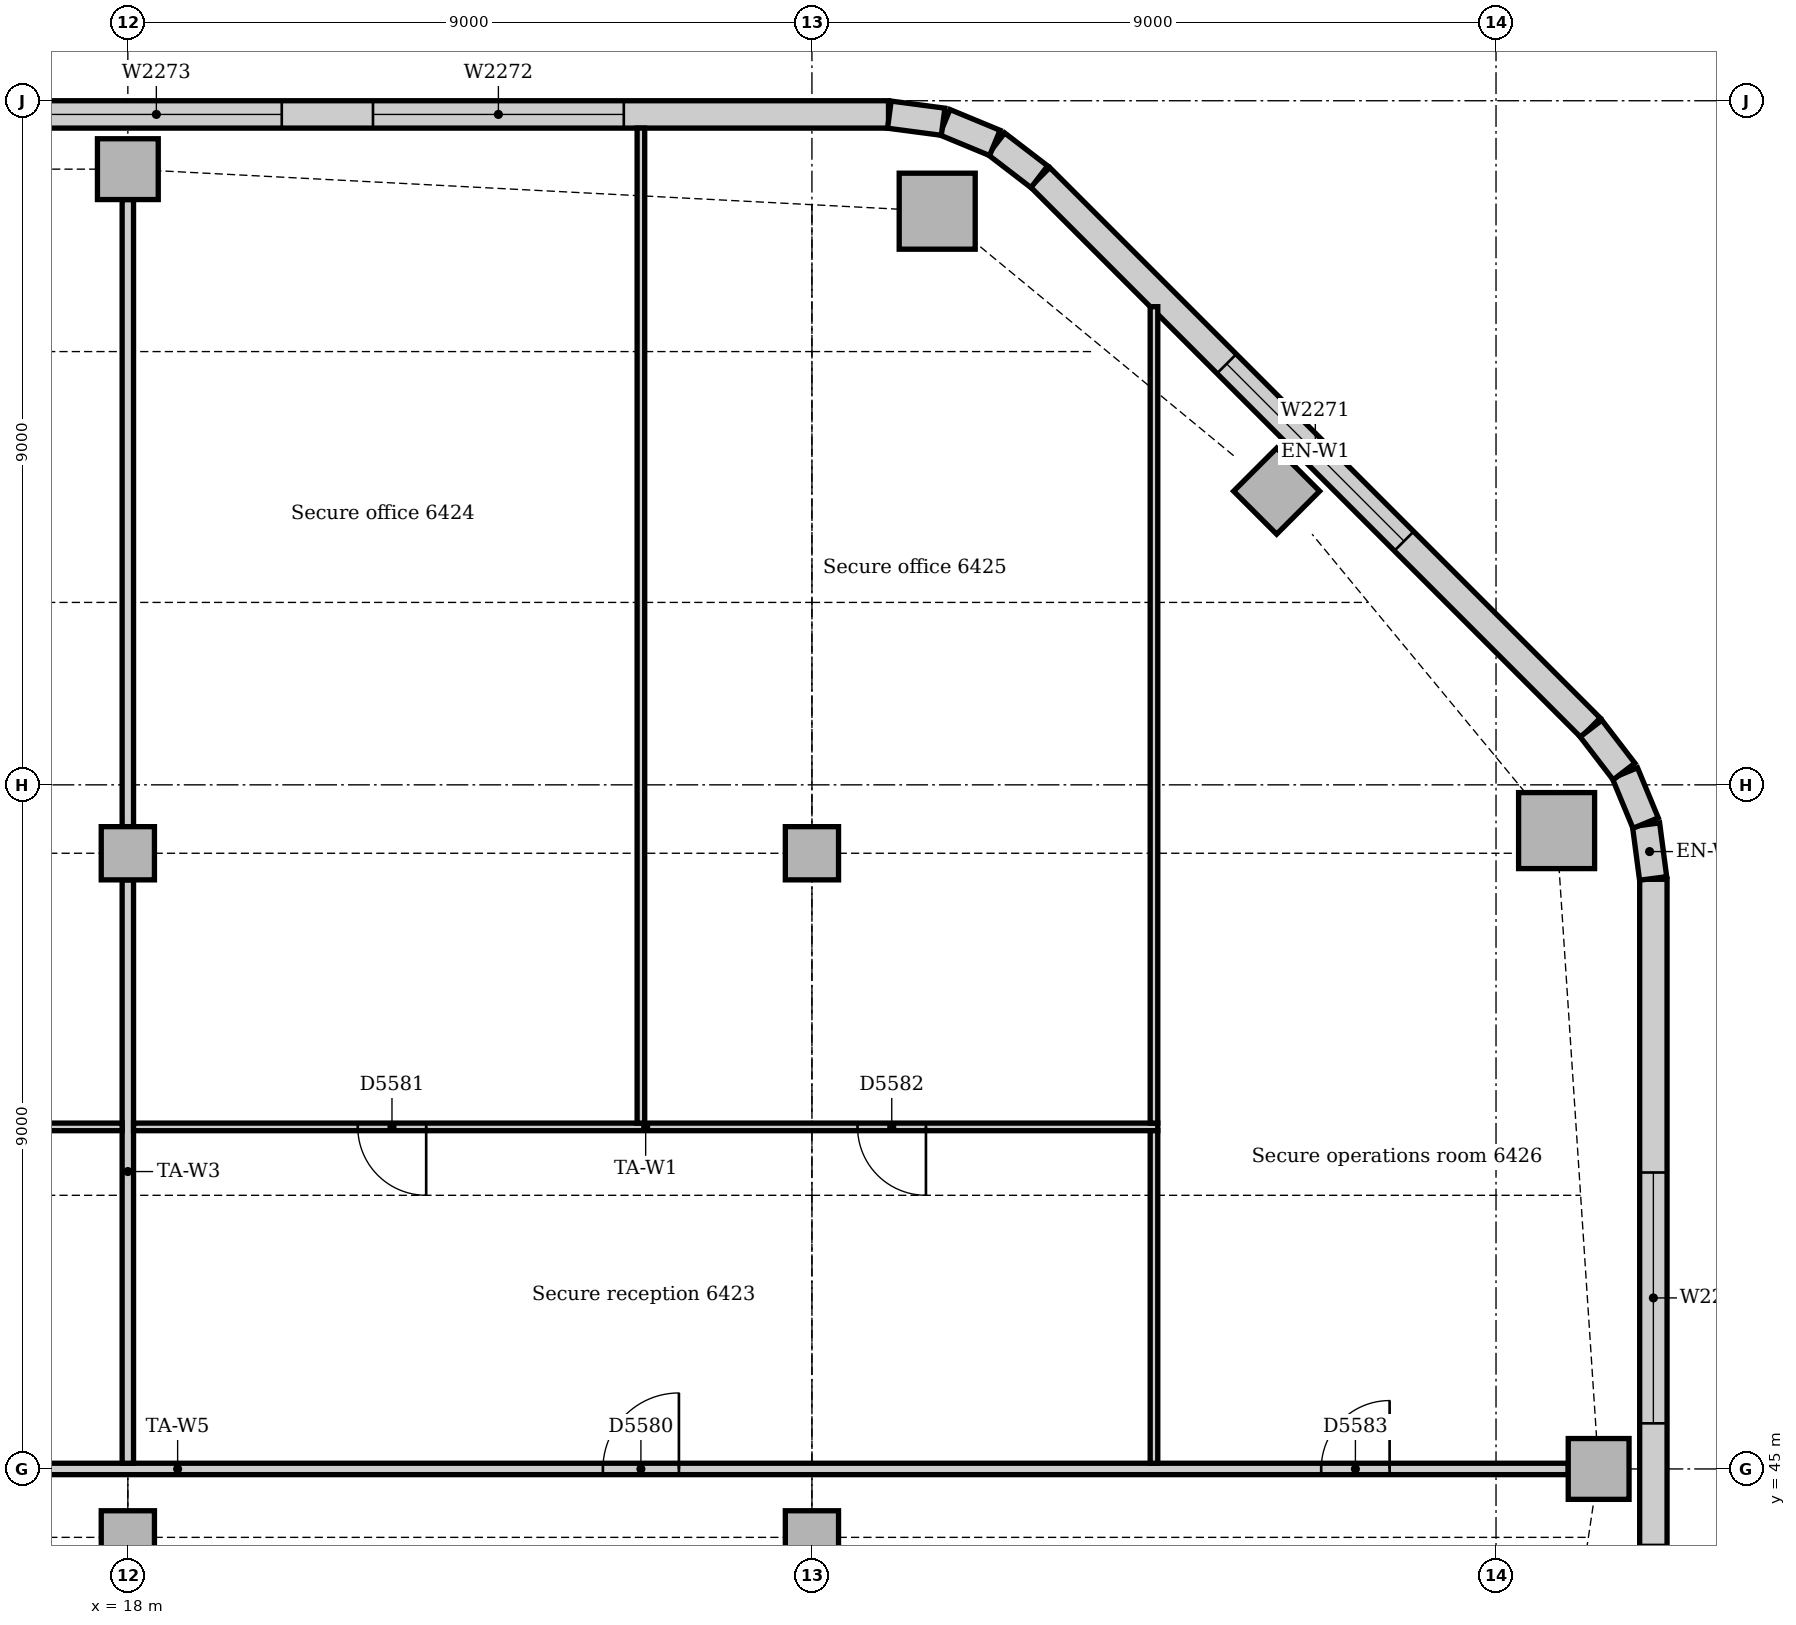
"""IFC4 building model, lengths in metres.
Left out: names, types, materials, properties, quantities, classifications, styles, units other than length and angle.
Written with IfcOpenShell. Run it as: python <this file> out.ifc"""

import sys

from ifc_helpers import new_model, si_unit, direction, frame, frame_2d, origin, origin_2d, place, context, subcontext, project, spatial, rectangle, extrude, element, fill, save


model = new_model("IFC4")
c1 = context("Model", 3, precision=1e-05, world=origin(), true_north=direction((0.0, 1.0)))
c2 = subcontext(c1, "Body", "Model", "MODEL_VIEW")
j1 = project(units=[si_unit("LENGTHUNIT", "METRE"), si_unit("PLANEANGLEUNIT", "RADIAN")], contexts=[c1])
p1 = place(None, origin())
s1 = spatial("IfcSite", under=j1, at=p1, CompositionType="ELEMENT")
p2 = place(p1, origin())
s2 = spatial("IfcBuilding", under=s1, at=p2, CompositionType="ELEMENT")
p3 = place(p2, frame((0.0, 0.0, 267.0)))
s3 = spatial("IfcBuildingStorey", under=s2, at=p3, CompositionType="ELEMENT", Elevation=267.0)
for number, where, z_axis, x_axis in (
    (1, (36.797, 53.398, 0.0), (0.0, 0.0, 1.0), (1.0, 0.0, 0.0)),
    (2, (28.648, 61.547, 0.0), (0.0, 0.0, 1.0), (1.0, 0.0, 0.0)),
):
    element("IfcColumn", number, at=place(p3, frame(where, z_axis=z_axis, x_axis=x_axis)), inside=s3, PredefinedType="COLUMN", context=c2, shape_type="SweptSolid", body=[
        extrude(rectangle(XDim=1.0, YDim=1.0, at=origin_2d()), origin(), (0.0, 0.0, 1.0), 3.85),
    ])
for number, where, z_axis, x_axis in (
    (3, (37.35, 45.0, 0.0), (0.0, 0.0, 1.0), (1.0, 0.0, 0.0)),
    (4, (33.114, 57.864, 0.0), (0.0, 0.0, 1.0), (0.707, 0.707, 0.0)),
    (5, (18.0, 62.1, 0.0), (0.0, 0.0, 1.0), (1.0, 0.0, 0.0)),
):
    element("IfcColumn", number, at=place(p3, frame(where, z_axis=z_axis, x_axis=x_axis)), inside=s3, PredefinedType="COLUMN", context=c2, shape_type="SweptSolid", body=[
        extrude(rectangle(XDim=0.8, YDim=0.8, at=origin_2d()), origin(), (0.0, 0.0, 1.0), 3.85),
    ])
for number, where, z_axis, x_axis in (
    (6, (18.0, 44.1, 0.0), (0.0, 0.0, 1.0), (1.0, 0.0, 0.0)),
    (7, (18.0, 53.1, 0.0), (0.0, 0.0, 1.0), (1.0, 0.0, 0.0)),
    (8, (27.0, 44.1, 0.0), (0.0, 0.0, 1.0), (1.0, 0.0, 0.0)),
    (9, (27.0, 53.1, 0.0), (0.0, 0.0, 1.0), (1.0, 0.0, 0.0)),
):
    element("IfcColumn", number, at=place(p3, frame(where, z_axis=z_axis, x_axis=x_axis)), inside=s3, PredefinedType="COLUMN", context=c2, shape_type="SweptSolid", body=[
        extrude(rectangle(XDim=0.7, YDim=0.7, at=origin_2d()), origin(), (0.0, 0.0, 1.0), 3.85),
    ])
p4 = place(p3, frame((38.07, 28.243, 0.0), z_axis=(0.0, 0.0, 1.0), x_axis=(0.0, 1.0, 0.0)))
e10 = element("IfcWall", 10, at=p4, inside=s3, PredefinedType="STANDARD", context=c2, shape_type="SweptSolid", body=[
    extrude(rectangle(XDim=24.515, YDim=0.36, at=frame_2d((12.257, 0.0))), origin(), (0.0, 0.0, 1.0), 3.85),
])
p5 = place(p4, frame((3.857, 0.0, 0.9)))
e11 = element("IfcOpeningElement", 11, at=p5, cuts=e10, PredefinedType="OPENING", context=c2, shape_type="SweptSolid", body=[
    extrude(rectangle(XDim=3.3, YDim=1.6, at=frame_2d((1.65, 0.8))), frame((0.0, 0.19, 0.0), z_axis=(0.0, -1.0, 0.0), x_axis=(1.0, 0.0, 0.0)), (0.0, 0.0, 1.0), 0.38),
])
p6 = place(p4, frame((8.357, 0.0, 0.9)))
e12 = element("IfcOpeningElement", 12, at=p6, cuts=e10, PredefinedType="OPENING", context=c2, shape_type="SweptSolid", body=[
    extrude(rectangle(XDim=3.3, YDim=1.6, at=frame_2d((1.65, 0.8))), frame((0.0, 0.19, 0.0), z_axis=(0.0, -1.0, 0.0), x_axis=(1.0, 0.0, 0.0)), (0.0, 0.0, 1.0), 0.38),
])
p7 = place(p4, frame((13.957, 0.0, 0.9)))
e13 = element("IfcOpeningElement", 13, at=p7, cuts=e10, PredefinedType="OPENING", context=c2, shape_type="SweptSolid", body=[
    extrude(rectangle(XDim=1.8, YDim=1.6, at=frame_2d((0.9, 0.8))), frame((0.0, 0.19, 0.0), z_axis=(0.0, -1.0, 0.0), x_axis=(1.0, 0.0, 0.0)), (0.0, 0.0, 1.0), 0.38),
])
p8 = place(p4, frame((17.357, 0.0, 0.9)))
e14 = element("IfcOpeningElement", 14, at=p8, cuts=e10, PredefinedType="OPENING", context=c2, shape_type="SweptSolid", body=[
    extrude(rectangle(XDim=3.3, YDim=1.6, at=frame_2d((1.65, 0.8))), frame((0.0, 0.19, 0.0), z_axis=(0.0, -1.0, 0.0), x_axis=(1.0, 0.0, 0.0)), (0.0, 0.0, 1.0), 0.38),
])
p9 = place(p3, frame((37.244, 54.751, 0.0), z_axis=(0.0, 0.0, 1.0), x_axis=(-0.707106781187, 0.707106781187, 0.0)))
e15 = element("IfcWall", 15, at=p9, inside=s3, PredefinedType="STANDARD", context=c2, shape_type="SweptSolid", body=[
    extrude(rectangle(XDim=10.243, YDim=0.36, at=frame_2d((5.121, 0.0))), origin(), (0.0, 0.0, 1.0), 3.85),
])
p10 = place(p9, frame((3.471, 0.0, 0.9)))
e16 = element("IfcOpeningElement", 16, at=p10, cuts=e15, PredefinedType="OPENING", context=c2, shape_type="SweptSolid", body=[
    extrude(rectangle(XDim=3.3, YDim=1.6, at=frame_2d((1.65, 0.8))), frame((0.0, 0.19, 0.0), z_axis=(0.0, -1.0, 0.0), x_axis=(1.0, 0.0, 0.0)), (0.0, 0.0, 1.0), 0.38),
])
p11 = place(p3, frame((28.007, 62.82, 0.0), z_axis=(0.0, 0.0, 1.0), x_axis=(-1.0, 0.0, 0.0)))
e17 = element("IfcWall", 17, at=p11, inside=s3, PredefinedType="STANDARD", context=c2, shape_type="SweptSolid", body=[
    extrude(rectangle(XDim=23.765, YDim=0.36, at=frame_2d((11.882, 0.0))), origin(), (0.0, 0.0, 1.0), 3.85),
])
p12 = place(p11, frame((3.482, 0.0, 0.9)))
e18 = element("IfcOpeningElement", 18, at=p12, cuts=e17, PredefinedType="OPENING", context=c2, shape_type="SweptSolid", body=[
    extrude(rectangle(XDim=3.3, YDim=1.6, at=frame_2d((1.65, 0.8))), frame((0.0, 0.19, 0.0), z_axis=(0.0, -1.0, 0.0), x_axis=(1.0, 0.0, 0.0)), (0.0, 0.0, 1.0), 0.38),
])
p13 = place(p11, frame((7.982, 0.0, 0.9)))
e19 = element("IfcOpeningElement", 19, at=p13, cuts=e17, PredefinedType="OPENING", context=c2, shape_type="SweptSolid", body=[
    extrude(rectangle(XDim=3.3, YDim=1.6, at=frame_2d((1.65, 0.8))), frame((0.0, 0.19, 0.0), z_axis=(0.0, -1.0, 0.0), x_axis=(1.0, 0.0, 0.0)), (0.0, 0.0, 1.0), 0.38),
])
p14 = place(p11, frame((12.482, 0.0, 0.9)))
e20 = element("IfcOpeningElement", 20, at=p14, cuts=e17, PredefinedType="OPENING", context=c2, shape_type="SweptSolid", body=[
    extrude(rectangle(XDim=3.3, YDim=1.6, at=frame_2d((1.65, 0.8))), frame((0.0, 0.19, 0.0), z_axis=(0.0, -1.0, 0.0), x_axis=(1.0, 0.0, 0.0)), (0.0, 0.0, 1.0), 0.38),
])
p15 = place(p11, frame((16.982, 0.0, 0.9)))
e21 = element("IfcOpeningElement", 21, at=p15, cuts=e17, PredefinedType="OPENING", context=c2, shape_type="SweptSolid", body=[
    extrude(rectangle(XDim=3.3, YDim=1.6, at=frame_2d((1.65, 0.8))), frame((0.0, 0.19, 0.0), z_axis=(0.0, -1.0, 0.0), x_axis=(1.0, 0.0, 0.0)), (0.0, 0.0, 1.0), 0.38),
])
for number, where, z_axis, x_axis in (
    (22, (38.067, 52.769, 0.0), (0.0, 0.0, 1.0), (-0.131, 0.991, 0.0)),
    (23, (37.968, 53.497, 0.0), (0.0, 0.0, 1.0), (-0.383, 0.924, 0.0)),
):
    element("IfcWall", number, at=place(p3, frame(where, z_axis=z_axis, x_axis=x_axis)), inside=s3, PredefinedType="STANDARD", context=c2, shape_type="SweptSolid", body=[
        extrude(rectangle(XDim=0.713, YDim=0.36, at=frame_2d((0.356, 0.0))), origin(), (0.0, 0.0, 1.0), 3.85),
    ])
for number, where, z_axis, x_axis in (
    (24, (37.684, 54.175, 0.0), (0.0, 0.0, 1.0), (-0.609, 0.793, 0.0)),
    (25, (29.991, 62.0, 0.0), (0.0, 0.0, 1.0), (-0.793, 0.609, 0.0)),
):
    element("IfcWall", number, at=place(p3, frame(where, z_axis=z_axis, x_axis=x_axis)), inside=s3, PredefinedType="STANDARD", context=c2, shape_type="SweptSolid", body=[
        extrude(rectangle(XDim=0.713, YDim=0.36, at=frame_2d((0.357, 0.0))), origin(), (0.0, 0.0, 1.0), 3.85),
    ])
for number, where, z_axis, x_axis in (
    (26, (29.406, 62.445, 0.0), (0.0, 0.0, 1.0), (-0.924, 0.383, 0.0)),
    (27, (28.726, 62.724, 0.0), (0.0, 0.0, 1.0), (-0.991, 0.131, 0.0)),
):
    element("IfcWall", number, at=place(p3, frame(where, z_axis=z_axis, x_axis=x_axis)), inside=s3, PredefinedType="STANDARD", context=c2, shape_type="SweptSolid", body=[
        extrude(rectangle(XDim=0.713, YDim=0.36, at=frame_2d((0.356, 0.0))), origin(), (0.0, 0.0, 1.0), 3.85),
    ])
p16 = place(p3, frame((0.36, 45.0, 0.0), z_axis=(0.0, 0.0, 1.0), x_axis=(1.0, 0.0, 0.0)))
e28 = element("IfcWall", 28, at=p16, inside=s3, PredefinedType="PARTITIONING", context=c2, shape_type="SweptSolid", body=[
    extrude(rectangle(XDim=36.59, YDim=0.15, at=frame_2d((18.295, 0.0))), origin(), (0.0, 0.0, 1.0), 3.85),
])
p17 = place(p16, frame((9.0, 0.0, 0.0)))
e29 = element("IfcOpeningElement", 29, at=p17, cuts=e28, PredefinedType="OPENING", context=c2, shape_type="SweptSolid", body=[
    extrude(rectangle(XDim=1.0, YDim=2.1, at=frame_2d((0.5, 1.05))), frame((0.0, 0.085, 0.0), z_axis=(0.0, -1.0, 0.0), x_axis=(1.0, 0.0, 0.0)), (0.0, 0.0, 1.0), 0.17),
])
p18 = place(p16, frame((23.89, 0.0, 0.0)))
e30 = element("IfcOpeningElement", 30, at=p18, cuts=e28, PredefinedType="OPENING", context=c2, shape_type="SweptSolid", body=[
    extrude(rectangle(XDim=1.0, YDim=2.1, at=frame_2d((0.5, 1.05))), frame((0.0, 0.085, 0.0), z_axis=(0.0, -1.0, 0.0), x_axis=(1.0, 0.0, 0.0)), (0.0, 0.0, 1.0), 0.17),
])
p19 = place(p16, frame((33.34, 0.0, 0.0)))
e31 = element("IfcOpeningElement", 31, at=p19, cuts=e28, PredefinedType="OPENING", context=c2, shape_type="SweptSolid", body=[
    extrude(rectangle(XDim=0.9, YDim=2.1, at=frame_2d((0.45, 1.05))), frame((0.0, 0.085, 0.0), z_axis=(0.0, -1.0, 0.0), x_axis=(1.0, 0.0, 0.0)), (0.0, 0.0, 1.0), 0.17),
])
p20 = place(p3, frame((18.0, 45.075, 0.0), z_axis=(0.0, 0.0, 1.0), x_axis=(0.0, 1.0, 0.0)))
e32 = element("IfcWall", 32, at=p20, inside=s3, PredefinedType="PARTITIONING", context=c2, shape_type="SweptSolid", body=[
    extrude(rectangle(XDim=7.675, YDim=0.15, at=frame_2d((3.837, 0.0))), origin(), (0.0, 0.0, 1.0), 3.4),
])
p21 = place(p3, frame((18.0, 53.45, 0.0), z_axis=(0.0, 0.0, 1.0), x_axis=(0.0, 1.0, 0.0)))
e33 = element("IfcWall", 33, at=p21, inside=s3, PredefinedType="PARTITIONING", context=c2, shape_type="SweptSolid", body=[
    extrude(rectangle(XDim=8.25, YDim=0.15, at=frame_2d((4.125, 0.0))), origin(), (0.0, 0.0, 1.0), 3.4),
])
p22 = place(p3, frame((18.075, 49.5, 0.0), z_axis=(0.0, 0.0, 1.0), x_axis=(1.0, 0.0, 0.0)))
e34 = element("IfcWall", 34, at=p22, inside=s3, PredefinedType="PARTITIONING", context=c2, shape_type="SweptSolid", body=[
    extrude(rectangle(XDim=13.475, YDim=0.1, at=frame_2d((6.737, 0.0))), origin(), (0.0, 0.0, 1.0), 3.85),
])
p23 = place(p22, frame((2.95, 0.0, 0.0)))
e35 = element("IfcOpeningElement", 35, at=p23, cuts=e34, PredefinedType="OPENING", context=c2, shape_type="SweptSolid", body=[
    extrude(rectangle(XDim=0.9, YDim=2.1, at=frame_2d((0.45, 1.05))), frame((0.0, 0.06, 0.0), z_axis=(0.0, -1.0, 0.0), x_axis=(1.0, 0.0, 0.0)), (0.0, 0.0, 1.0), 0.12),
])
p24 = place(p22, frame((9.525, 0.0, 0.0)))
e36 = element("IfcOpeningElement", 36, at=p24, cuts=e34, PredefinedType="OPENING", context=c2, shape_type="SweptSolid", body=[
    extrude(rectangle(XDim=0.9, YDim=2.1, at=frame_2d((0.45, 1.05))), frame((0.0, 0.06, 0.0), z_axis=(0.0, -1.0, 0.0), x_axis=(1.0, 0.0, 0.0)), (0.0, 0.0, 1.0), 0.12),
])
p25 = place(p3, frame((0.36, 49.5, 0.0), z_axis=(0.0, 0.0, 1.0), x_axis=(1.0, 0.0, 0.0)))
e37 = element("IfcWall", 37, at=p25, inside=s3, PredefinedType="PARTITIONING", context=c2, shape_type="SweptSolid", body=[
    extrude(rectangle(XDim=17.565, YDim=0.1, at=frame_2d((8.783, 0.0))), origin(), (0.0, 0.0, 1.0), 3.85),
])
p26 = place(p25, frame((3.95, 0.0, 0.0)))
e38 = element("IfcOpeningElement", 38, at=p26, cuts=e37, PredefinedType="OPENING", context=c2, shape_type="SweptSolid", body=[
    extrude(rectangle(XDim=0.9, YDim=2.1, at=frame_2d((0.45, 1.05))), frame((0.0, 0.06, 0.0), z_axis=(0.0, -1.0, 0.0), x_axis=(1.0, 0.0, 0.0)), (0.0, 0.0, 1.0), 0.12),
])
p27 = place(p25, frame((12.59, 0.0, 0.0)))
e39 = element("IfcOpeningElement", 39, at=p27, cuts=e37, PredefinedType="OPENING", context=c2, shape_type="SweptSolid", body=[
    extrude(rectangle(XDim=0.9, YDim=2.1, at=frame_2d((0.45, 1.05))), frame((0.0, 0.06, 0.0), z_axis=(0.0, -1.0, 0.0), x_axis=(1.0, 0.0, 0.0)), (0.0, 0.0, 1.0), 0.12),
])
p28 = place(p3, frame((31.5, 45.075, 0.0), z_axis=(0.0, 0.0, 1.0), x_axis=(0.0, 1.0, 0.0)))
e40 = element("IfcWall", 40, at=p28, inside=s3, PredefinedType="PARTITIONING", context=c2, shape_type="SweptSolid", body=[
    extrude(rectangle(XDim=4.375, YDim=0.1, at=frame_2d((2.188, 0.0))), origin(), (0.0, 0.0, 1.0), 3.85),
])
p29 = place(p3, frame((31.5, 49.55, 0.0), z_axis=(0.0, 0.0, 1.0), x_axis=(0.0, 1.0, 0.0)))
e41 = element("IfcWall", 41, at=p29, inside=s3, PredefinedType="PARTITIONING", context=c2, shape_type="SweptSolid", body=[
    extrude(rectangle(XDim=10.741, YDim=0.1, at=frame_2d((5.37, 0.0))), origin(), (0.0, 0.0, 1.0), 3.85),
])
p30 = place(p3, frame((24.75, 49.55, 0.0), z_axis=(0.0, 0.0, 1.0), x_axis=(0.0, 1.0, 0.0)))
e42 = element("IfcWall", 42, at=p30, inside=s3, PredefinedType="PARTITIONING", context=c2, shape_type="SweptSolid", body=[
    extrude(rectangle(XDim=13.09, YDim=0.1, at=frame_2d((6.545, 0.0))), origin(), (0.0, 0.0, 1.0), 3.85),
])
p31 = place(p8, origin())
e43 = element("IfcWindow", 43, at=p31, inside=s3, PartitioningType="SINGLE_PANEL", PredefinedType="WINDOW", context=c2, shape_type="SweptSolid", body=[
    extrude(rectangle(XDim=3.3, YDim=1.6, at=frame_2d((1.65, 0.8))), frame((0.0, 0.13, 0.0), z_axis=(0.0, -1.0, 0.0), x_axis=(1.0, 0.0, 0.0)), (0.0, 0.0, 1.0), 0.06),
])
fill(e14, e43)
p32 = place(p10, origin())
e44 = element("IfcWindow", 44, at=p32, inside=s3, PartitioningType="SINGLE_PANEL", PredefinedType="WINDOW", context=c2, shape_type="SweptSolid", body=[
    extrude(rectangle(XDim=3.3, YDim=1.6, at=frame_2d((1.65, 0.8))), frame((0.0, 0.13, 0.0), z_axis=(0.0, -1.0, 0.0), x_axis=(1.0, 0.0, 0.0)), (0.0, 0.0, 1.0), 0.06),
])
fill(e16, e44)
p33 = place(p12, origin())
e45 = element("IfcWindow", 45, at=p33, inside=s3, PartitioningType="SINGLE_PANEL", PredefinedType="WINDOW", context=c2, shape_type="SweptSolid", body=[
    extrude(rectangle(XDim=3.3, YDim=1.6, at=frame_2d((1.65, 0.8))), frame((0.0, 0.13, 0.0), z_axis=(0.0, -1.0, 0.0), x_axis=(1.0, 0.0, 0.0)), (0.0, 0.0, 1.0), 0.06),
])
fill(e18, e45)
p34 = place(p13, origin())
e46 = element("IfcWindow", 46, at=p34, inside=s3, PartitioningType="SINGLE_PANEL", PredefinedType="WINDOW", context=c2, shape_type="SweptSolid", body=[
    extrude(rectangle(XDim=3.3, YDim=1.6, at=frame_2d((1.65, 0.8))), frame((0.0, 0.13, 0.0), z_axis=(0.0, -1.0, 0.0), x_axis=(1.0, 0.0, 0.0)), (0.0, 0.0, 1.0), 0.06),
])
fill(e19, e46)
p35 = place(p18, origin())
e47 = element("IfcDoor", 47, at=p35, inside=s3, OperationType="SINGLE_SWING_RIGHT", PredefinedType="DOOR", context=c2, shape_type="SweptSolid", body=[
    extrude(rectangle(XDim=1.0, YDim=2.1, at=frame_2d((0.5, 1.05))), frame((0.0, 0.025, 0.0), z_axis=(0.0, -1.0, 0.0), x_axis=(1.0, 0.0, 0.0)), (0.0, 0.0, 1.0), 0.05),
])
fill(e30, e47)
p36 = place(p23, frame((0.9, 0.0, 0.0), z_axis=(0.0, 0.0, 1.0), x_axis=(-1.0, 0.0, 0.0)))
e48 = element("IfcDoor", 48, at=p36, inside=s3, OperationType="SINGLE_SWING_LEFT", PredefinedType="DOOR", context=c2, shape_type="SweptSolid", body=[
    extrude(rectangle(XDim=0.9, YDim=2.1, at=frame_2d((0.45, 1.05))), frame((0.0, 0.025, 0.0), z_axis=(0.0, -1.0, 0.0), x_axis=(1.0, 0.0, 0.0)), (0.0, 0.0, 1.0), 0.05),
])
fill(e35, e48)
p37 = place(p24, frame((0.9, 0.0, 0.0), z_axis=(0.0, 0.0, 1.0), x_axis=(-1.0, 0.0, 0.0)))
e49 = element("IfcDoor", 49, at=p37, inside=s3, OperationType="SINGLE_SWING_LEFT", PredefinedType="DOOR", context=c2, shape_type="SweptSolid", body=[
    extrude(rectangle(XDim=0.9, YDim=2.1, at=frame_2d((0.45, 1.05))), frame((0.0, 0.025, 0.0), z_axis=(0.0, -1.0, 0.0), x_axis=(1.0, 0.0, 0.0)), (0.0, 0.0, 1.0), 0.05),
])
fill(e36, e49)
p38 = place(p19, origin())
e50 = element("IfcDoor", 50, at=p38, inside=s3, OperationType="SINGLE_SWING_RIGHT", PredefinedType="DOOR", context=c2, shape_type="SweptSolid", body=[
    extrude(rectangle(XDim=0.9, YDim=2.1, at=frame_2d((0.45, 1.05))), frame((0.0, 0.025, 0.0), z_axis=(0.0, -1.0, 0.0), x_axis=(1.0, 0.0, 0.0)), (0.0, 0.0, 1.0), 0.05),
])
fill(e31, e50)
save(model, sys.argv[1])
